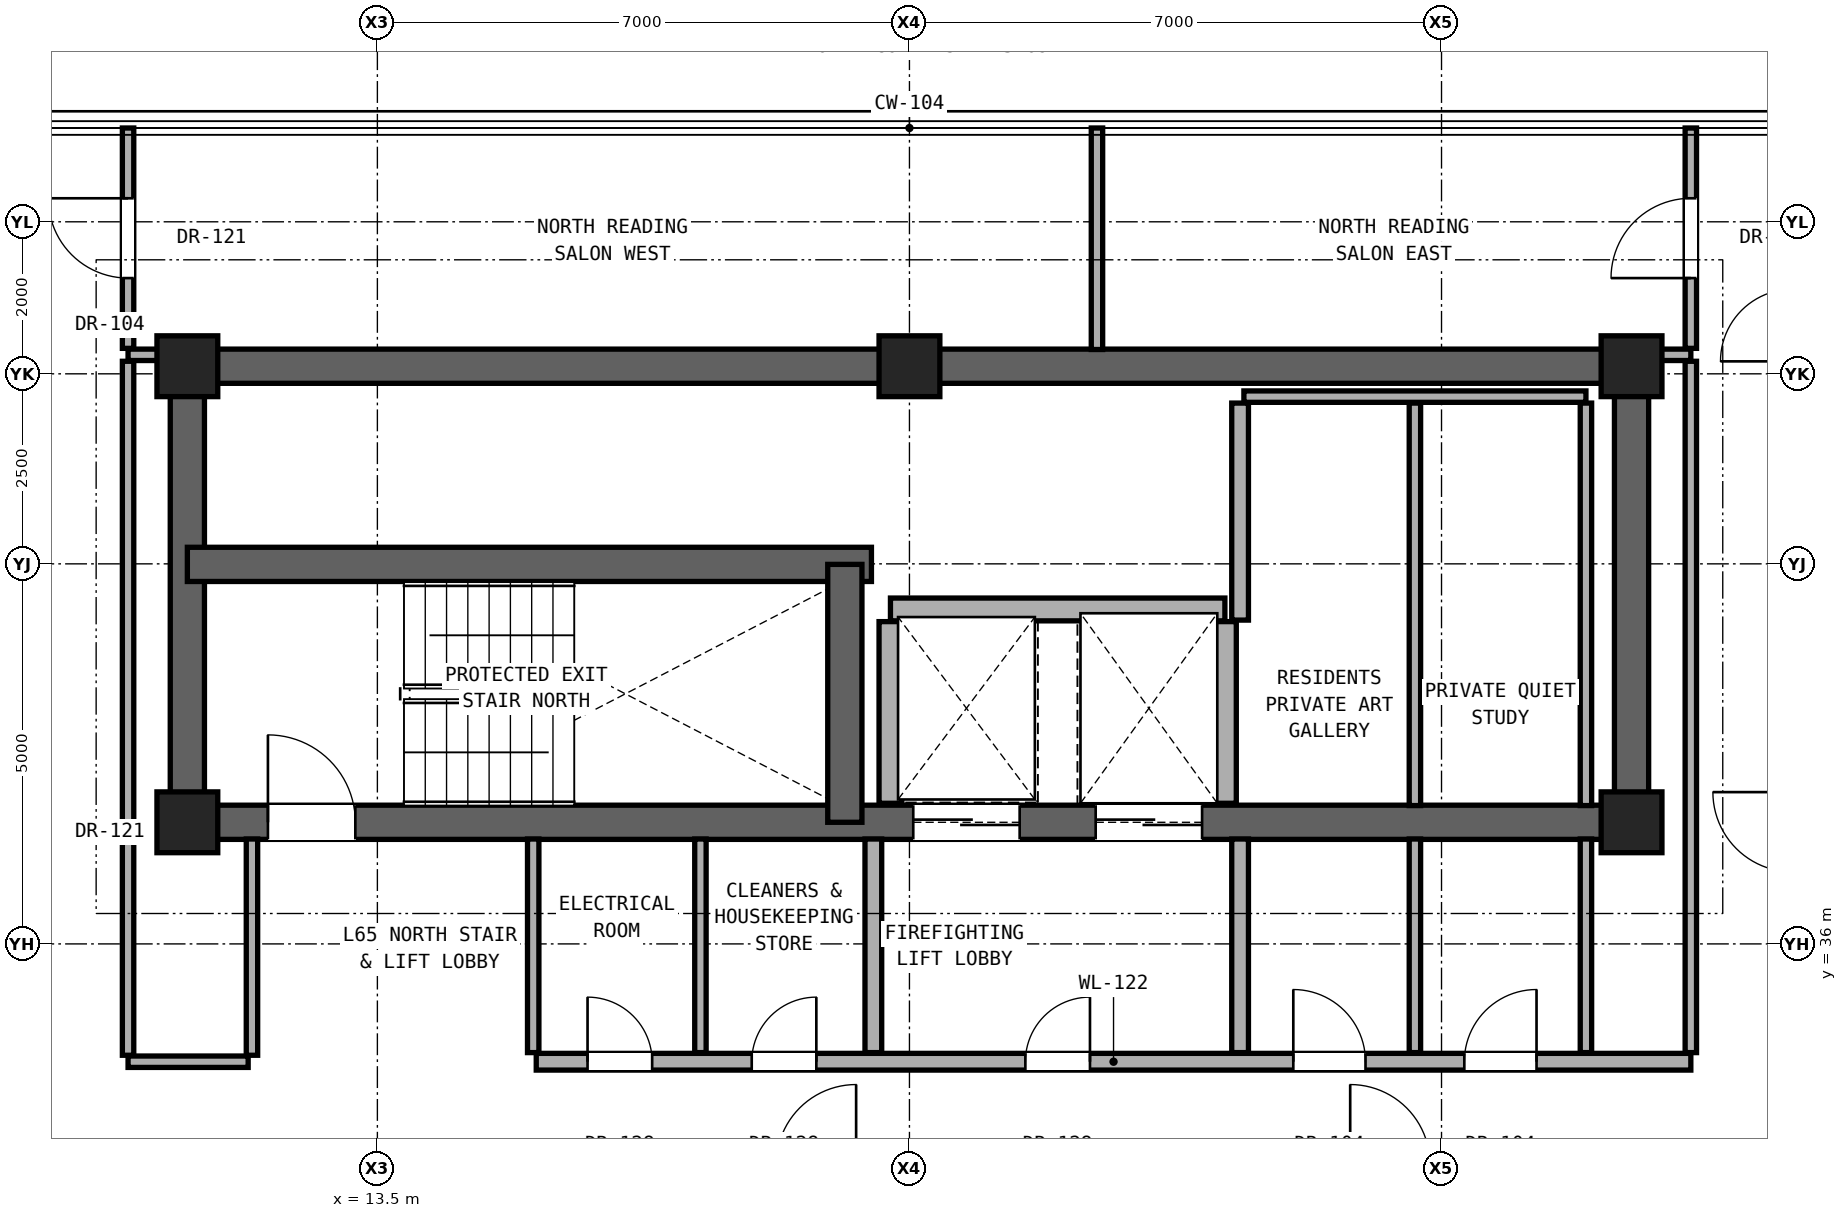
"""IFC4 building model, lengths in metres.
Left out: names, types, materials, properties, quantities, classifications, styles, units other than length and angle.
Written with IfcOpenShell. Run it as: python <this file> out.ifc"""

import sys

from ifc_helpers import new_model, si_unit, direction, frame, frame_2d, origin, origin_2d, place, context, subcontext, project, spatial, rectangle, extrude, element, fill, save


model = new_model("IFC4")
c1 = context("Model", 3, precision=1e-05, world=origin(), true_north=direction((0.0, 1.0)))
c2 = subcontext(c1, "Body", "Model", "MODEL_VIEW")
j1 = project(units=[si_unit("LENGTHUNIT", "METRE"), si_unit("PLANEANGLEUNIT", "RADIAN")], contexts=[c1])
p1 = place(None, origin())
s1 = spatial("IfcSite", under=j1, at=p1, CompositionType="ELEMENT")
p2 = place(p1, origin())
s2 = spatial("IfcBuilding", under=s1, at=p2, CompositionType="ELEMENT")
p3 = place(p2, frame((0.0, 0.0, 229.3)))
s3 = spatial("IfcBuildingStorey", under=s2, at=p3, CompositionType="ELEMENT", Elevation=229.3)
for number, where, z_axis, x_axis in (
    (1, (11.0, 37.6, 0.0), (0.0, 0.0, 1.0), (1.0, 0.0, 0.0)),
    (2, (30.0, 37.6, 0.0), (0.0, 0.0, 1.0), (1.0, 0.0, 0.0)),
    (3, (11.0, 43.6, 0.0), (0.0, 0.0, 1.0), (1.0, 0.0, 0.0)),
    (4, (20.5, 43.6, 0.0), (0.0, 0.0, 1.0), (1.0, 0.0, 0.0)),
    (5, (30.0, 43.6, 0.0), (0.0, 0.0, 1.0), (1.0, 0.0, 0.0)),
):
    element("IfcColumn", number, at=place(p3, frame(where, z_axis=z_axis, x_axis=x_axis)), inside=s3, PredefinedType="COLUMN", context=c2, shape_type="SweptSolid", body=[
        extrude(rectangle(XDim=0.8, YDim=0.8, at=origin_2d()), origin(), (0.0, 0.0, 1.0), 3.3),
    ])
p4 = place(p3, frame((11.0, 43.6, 0.0), z_axis=(0.0, 0.0, 1.0), x_axis=(1.0, 0.0, 0.0)))
e6 = element("IfcWall", 6, at=p4, inside=s3, PredefinedType="SHEAR", context=c2, shape_type="SweptSolid", body=[
    extrude(rectangle(XDim=19.0, YDim=0.45, at=frame_2d((9.5, 0.0))), origin(), (0.0, 0.0, 1.0), 3.1),
])
for number, where, z_axis, x_axis in (
    (7, (11.0, 37.6, 0.0), (0.0, 0.0, 1.0), (0.0, 1.0, 0.0)),
    (8, (30.0, 37.6, 0.0), (0.0, 0.0, 1.0), (0.0, 1.0, 0.0)),
):
    element("IfcWall", number, at=place(p3, frame(where, z_axis=z_axis, x_axis=x_axis)), inside=s3, PredefinedType="SHEAR", context=c2, shape_type="SweptSolid", body=[
        extrude(rectangle(XDim=6.0, YDim=0.45, at=frame_2d((3.0, 0.0))), origin(), (0.0, 0.0, 1.0), 3.1),
    ])
p5 = place(p3, frame((11.0, 37.6, 0.0), z_axis=(0.0, 0.0, 1.0), x_axis=(1.0, 0.0, 0.0)))
e9 = element("IfcWall", 9, at=p5, inside=s3, PredefinedType="SHEAR", context=c2, shape_type="SweptSolid", body=[
    extrude(rectangle(XDim=19.0, YDim=0.45, at=frame_2d((9.5, 0.0))), origin(), (0.0, 0.0, 1.0), 3.1),
])
p6 = place(p5, frame((1.06, 0.0, 0.0)))
e10 = element("IfcOpeningElement", 10, at=p6, cuts=e9, PredefinedType="OPENING", context=c2, shape_type="SweptSolid", body=[
    extrude(rectangle(XDim=1.15, YDim=2.2, at=frame_2d((0.575, 1.1))), frame((0.0, 0.235, 0.0), z_axis=(0.0, -1.0, 0.0), x_axis=(1.0, 0.0, 0.0)), (0.0, 0.0, 1.0), 0.47),
])
p7 = place(p5, frame((9.55, 0.0, 0.0)))
e11 = element("IfcOpeningElement", 11, at=p7, cuts=e9, PredefinedType="OPENING", context=c2, shape_type="SweptSolid", body=[
    extrude(rectangle(XDim=1.4, YDim=2.35, at=frame_2d((0.7, 1.175))), frame((0.0, 0.235, 0.0), z_axis=(0.0, -1.0, 0.0), x_axis=(1.0, 0.0, 0.0)), (0.0, 0.0, 1.0), 0.47),
])
p8 = place(p5, frame((11.95, 0.0, 0.0)))
e12 = element("IfcOpeningElement", 12, at=p8, cuts=e9, PredefinedType="OPENING", context=c2, shape_type="SweptSolid", body=[
    extrude(rectangle(XDim=1.4, YDim=2.35, at=frame_2d((0.7, 1.175))), frame((0.0, 0.235, 0.0), z_axis=(0.0, -1.0, 0.0), x_axis=(1.0, 0.0, 0.0)), (0.0, 0.0, 1.0), 0.47),
])
p9 = place(p3, frame((11.0, 40.993, 0.0), z_axis=(0.0, 0.0, 1.0), x_axis=(1.0, 0.0, 0.0)))
e13 = element("IfcWall", 13, at=p9, inside=s3, PredefinedType="SHEAR", context=c2, shape_type="SweptSolid", body=[
    extrude(rectangle(XDim=9.0, YDim=0.45, at=frame_2d((4.5, 0.0))), origin(), (0.0, 0.0, 1.0), 3.1),
])
p10 = place(p3, frame((19.65, 37.6, 0.0), z_axis=(0.0, 0.0, 1.0), x_axis=(0.0, 1.0, 0.0)))
e14 = element("IfcWall", 14, at=p10, inside=s3, PredefinedType="SHEAR", context=c2, shape_type="SweptSolid", body=[
    extrude(rectangle(XDim=3.393, YDim=0.45, at=frame_2d((1.696, 0.0))), origin(), (0.0, 0.0, 1.0), 3.1),
])
p11 = place(p3, frame((10.22, 34.45, 0.0), z_axis=(0.0, 0.0, 1.0), x_axis=(1.0, 0.0, 0.0)))
e15 = element("IfcWall", 15, at=p11, inside=s3, PredefinedType="PARTITIONING", context=c2, shape_type="SweptSolid", body=[
    extrude(rectangle(XDim=1.58, YDim=0.15, at=frame_2d((0.79, 0.0))), origin(), (0.0, 0.0, 1.0), 2.236),
])
p12 = place(p3, frame((15.59, 34.45, 0.0), z_axis=(0.0, 0.0, 1.0), x_axis=(1.0, 0.0, 0.0)))
e16 = element("IfcWall", 16, at=p12, inside=s3, PredefinedType="SOLIDWALL", context=c2, shape_type="SweptSolid", body=[
    extrude(rectangle(XDim=15.19, YDim=0.22, at=frame_2d((7.595, 0.0))), origin(), (0.0, 0.0, 1.0), 2.236),
])
p13 = place(p12, frame((6.435, 0.0, 0.0)))
e17 = element("IfcOpeningElement", 17, at=p13, cuts=e16, PredefinedType="OPENING", context=c2, shape_type="SweptSolid", body=[
    extrude(rectangle(XDim=0.85, YDim=2.01, at=frame_2d((0.425, 1.005))), frame((0.0, 0.12, 0.0), z_axis=(0.0, -1.0, 0.0), x_axis=(1.0, 0.0, 0.0)), (0.0, 0.0, 1.0), 0.24),
])
p14 = place(p12, frame((9.96, 0.0, 0.0)))
e18 = element("IfcOpeningElement", 18, at=p14, cuts=e16, PredefinedType="OPENING", context=c2, shape_type="SweptSolid", body=[
    extrude(rectangle(XDim=0.95, YDim=2.15, at=frame_2d((0.475, 1.075))), frame((0.0, 0.12, 0.0), z_axis=(0.0, -1.0, 0.0), x_axis=(1.0, 0.0, 0.0)), (0.0, 0.0, 1.0), 0.24),
])
p15 = place(p12, frame((12.21, 0.0, 0.0)))
e19 = element("IfcOpeningElement", 19, at=p15, cuts=e16, PredefinedType="OPENING", context=c2, shape_type="SweptSolid", body=[
    extrude(rectangle(XDim=0.95, YDim=2.15, at=frame_2d((0.475, 1.075))), frame((0.0, 0.12, 0.0), z_axis=(0.0, -1.0, 0.0), x_axis=(1.0, 0.0, 0.0)), (0.0, 0.0, 1.0), 0.24),
])
p16 = place(p12, frame((0.675, 0.0, 0.0)))
e20 = element("IfcOpeningElement", 20, at=p16, cuts=e16, PredefinedType="OPENING", context=c2, shape_type="SweptSolid", body=[
    extrude(rectangle(XDim=0.85, YDim=2.01, at=frame_2d((0.425, 1.005))), frame((0.0, 0.12, 0.0), z_axis=(0.0, -1.0, 0.0), x_axis=(1.0, 0.0, 0.0)), (0.0, 0.0, 1.0), 0.24),
])
p17 = place(p12, frame((2.835, 0.0, 0.0)))
e21 = element("IfcOpeningElement", 21, at=p17, cuts=e16, PredefinedType="OPENING", context=c2, shape_type="SweptSolid", body=[
    extrude(rectangle(XDim=0.85, YDim=2.01, at=frame_2d((0.425, 1.005))), frame((0.0, 0.12, 0.0), z_axis=(0.0, -1.0, 0.0), x_axis=(1.0, 0.0, 0.0)), (0.0, 0.0, 1.0), 0.24),
])
p18 = place(p3, frame((20.25, 40.4, 0.0), z_axis=(0.0, 0.0, 1.0), x_axis=(1.0, 0.0, 0.0)))
e22 = element("IfcWall", 22, at=p18, inside=s3, PredefinedType="SOLIDWALL", context=c2, shape_type="SweptSolid", body=[
    extrude(rectangle(XDim=4.4, YDim=0.3, at=frame_2d((2.2, 0.0))), origin(), (0.0, 0.0, 1.0), 3.1),
])
p19 = place(p3, frame((24.9, 43.2, 0.0), z_axis=(0.0, 0.0, 1.0), x_axis=(1.0, 0.0, 0.0)))
e23 = element("IfcWall", 23, at=p19, inside=s3, PredefinedType="PARTITIONING", context=c2, shape_type="SweptSolid", body=[
    extrude(rectangle(XDim=4.5, YDim=0.15, at=frame_2d((2.25, 0.0))), origin(), (0.0, 0.0, 1.0), 3.1),
])
for number, where, z_axis, x_axis in (
    (24, (10.22, 43.75, 0.0), (0.0, 0.0, 1.0), (1.0, 0.0, 0.0)),
    (25, (30.22, 43.75, 0.0), (0.0, 0.0, 1.0), (1.0, 0.0, 0.0)),
):
    element("IfcWall", number, at=place(p3, frame(where, z_axis=z_axis, x_axis=x_axis)), inside=s3, PredefinedType="PARTITIONING", context=c2, shape_type="SweptSolid", body=[
        extrude(rectangle(XDim=0.56, YDim=0.15, at=frame_2d((0.28, 0.0))), origin(), (0.0, 0.0, 1.0), 3.1),
    ])
p20 = place(p3, frame((10.22, 34.535, 0.0), z_axis=(0.0, 0.0, 1.0), x_axis=(0.0, 1.0, 0.0)))
e26 = element("IfcWall", 26, at=p20, inside=s3, PredefinedType="PARTITIONING", context=c2, shape_type="SweptSolid", body=[
    extrude(rectangle(XDim=9.13, YDim=0.15, at=frame_2d((4.565, 0.0))), origin(), (0.0, 0.0, 1.0), 2.492),
])
p21 = place(p3, frame((10.22, 43.835, 0.0), z_axis=(0.0, 0.0, 1.0), x_axis=(0.0, 1.0, 0.0)))
e27 = element("IfcWall", 27, at=p21, inside=s3, PredefinedType="PARTITIONING", context=c2, shape_type="SweptSolid", body=[
    extrude(rectangle(XDim=2.899, YDim=0.15, at=frame_2d((1.449, 0.0))), origin(), (0.0, 0.0, 1.0), 3.1),
])
p22 = place(p21, frame((0.925, 0.0, 0.0)))
e28 = element("IfcOpeningElement", 28, at=p22, cuts=e27, PredefinedType="OPENING", context=c2, shape_type="SweptSolid", body=[
    extrude(rectangle(XDim=1.05, YDim=2.2, at=frame_2d((0.525, 1.1))), frame((0.0, 0.085, 0.0), z_axis=(0.0, -1.0, 0.0), x_axis=(1.0, 0.0, 0.0)), (0.0, 0.0, 1.0), 0.17),
])
p23 = place(p3, frame((11.85, 34.535, 0.0), z_axis=(0.0, 0.0, 1.0), x_axis=(0.0, 1.0, 0.0)))
e29 = element("IfcWall", 29, at=p23, inside=s3, PredefinedType="PARTITIONING", context=c2, shape_type="SweptSolid", body=[
    extrude(rectangle(XDim=2.845, YDim=0.15, at=frame_2d((1.422, 0.0))), origin(), (0.0, 0.0, 1.0), 3.1),
])
for number, where, z_axis, x_axis in (
    (30, (15.55, 34.57, 0.0), (0.0, 0.0, 1.0), (0.0, 1.0, 0.0)),
    (31, (17.75, 34.57, 0.0), (0.0, 0.0, 1.0), (0.0, 1.0, 0.0)),
):
    element("IfcWall", number, at=place(p3, frame(where, z_axis=z_axis, x_axis=x_axis)), inside=s3, PredefinedType="PARTITIONING", context=c2, shape_type="SweptSolid", body=[
        extrude(rectangle(XDim=2.81, YDim=0.15, at=frame_2d((1.405, 0.0))), origin(), (0.0, 0.0, 1.0), 3.1),
    ])
p24 = place(p3, frame((20.025, 34.57, 0.0), z_axis=(0.0, 0.0, 1.0), x_axis=(0.0, 1.0, 0.0)))
e32 = element("IfcWall", 32, at=p24, inside=s3, PredefinedType="SOLIDWALL", context=c2, shape_type="SweptSolid", body=[
    extrude(rectangle(XDim=2.81, YDim=0.22, at=frame_2d((1.405, 0.0))), origin(), (0.0, 0.0, 1.0), 3.1),
])
p25 = place(p3, frame((20.25, 37.85, 0.0), z_axis=(0.0, 0.0, 1.0), x_axis=(0.0, 1.0, 0.0)))
e33 = element("IfcWall", 33, at=p25, inside=s3, PredefinedType="SOLIDWALL", context=c2, shape_type="SweptSolid", body=[
    extrude(rectangle(XDim=2.39, YDim=0.3, at=frame_2d((1.195, 0.0))), origin(), (0.0, 0.0, 1.0), 3.1),
])
p26 = place(p3, frame((22.967, 43.82, 0.0), z_axis=(0.0, 0.0, 1.0), x_axis=(0.0, 1.0, 0.0)))
e34 = element("IfcWall", 34, at=p26, inside=s3, PredefinedType="PARTITIONING", context=c2, shape_type="SweptSolid", body=[
    extrude(rectangle(XDim=2.914, YDim=0.15, at=frame_2d((1.457, 0.0))), origin(), (0.0, 0.0, 1.0), 3.1),
])
p27 = place(p3, frame((24.65, 37.85, 0.0), z_axis=(0.0, 0.0, 1.0), x_axis=(0.0, 1.0, 0.0)))
e35 = element("IfcWall", 35, at=p27, inside=s3, PredefinedType="SOLIDWALL", context=c2, shape_type="SweptSolid", body=[
    extrude(rectangle(XDim=2.39, YDim=0.3, at=frame_2d((1.195, 0.0))), origin(), (0.0, 0.0, 1.0), 3.1),
])
p28 = place(p3, frame((24.85, 34.57, 0.0), z_axis=(0.0, 0.0, 1.0), x_axis=(0.0, 1.0, 0.0)))
e36 = element("IfcWall", 36, at=p28, inside=s3, PredefinedType="SOLIDWALL", context=c2, shape_type="SweptSolid", body=[
    extrude(rectangle(XDim=2.81, YDim=0.22, at=frame_2d((1.405, 0.0))), origin(), (0.0, 0.0, 1.0), 3.1),
])
p29 = place(p3, frame((24.85, 40.26, 0.0), z_axis=(0.0, 0.0, 1.0), x_axis=(0.0, 1.0, 0.0)))
e37 = element("IfcWall", 37, at=p29, inside=s3, PredefinedType="SOLIDWALL", context=c2, shape_type="SweptSolid", body=[
    extrude(rectangle(XDim=2.855, YDim=0.22, at=frame_2d((1.427, 0.0))), origin(), (0.0, 0.0, 1.0), 3.1),
])
p30 = place(p3, frame((27.15, 34.57, 0.0), z_axis=(0.0, 0.0, 1.0), x_axis=(0.0, 1.0, 0.0)))
e38 = element("IfcWall", 38, at=p30, inside=s3, PredefinedType="PARTITIONING", context=c2, shape_type="SweptSolid", body=[
    extrude(rectangle(XDim=2.81, YDim=0.15, at=frame_2d((1.405, 0.0))), origin(), (0.0, 0.0, 1.0), 3.1),
])
p31 = place(p3, frame((27.15, 37.82, 0.0), z_axis=(0.0, 0.0, 1.0), x_axis=(0.0, 1.0, 0.0)))
e39 = element("IfcWall", 39, at=p31, inside=s3, PredefinedType="PARTITIONING", context=c2, shape_type="SweptSolid", body=[
    extrude(rectangle(XDim=5.295, YDim=0.15, at=frame_2d((2.647, 0.0))), origin(), (0.0, 0.0, 1.0), 3.1),
])
p32 = place(p3, frame((29.4, 34.57, 0.0), z_axis=(0.0, 0.0, 1.0), x_axis=(0.0, 1.0, 0.0)))
e40 = element("IfcWall", 40, at=p32, inside=s3, PredefinedType="PARTITIONING", context=c2, shape_type="SweptSolid", body=[
    extrude(rectangle(XDim=2.81, YDim=0.15, at=frame_2d((1.405, 0.0))), origin(), (0.0, 0.0, 1.0), 3.1),
])
p33 = place(p3, frame((29.4, 37.82, 0.0), z_axis=(0.0, 0.0, 1.0), x_axis=(0.0, 1.0, 0.0)))
e41 = element("IfcWall", 41, at=p33, inside=s3, PredefinedType="PARTITIONING", context=c2, shape_type="SweptSolid", body=[
    extrude(rectangle(XDim=5.295, YDim=0.15, at=frame_2d((2.647, 0.0))), origin(), (0.0, 0.0, 1.0), 3.1),
])
p34 = place(p3, frame((30.78, 34.57, 0.0), z_axis=(0.0, 0.0, 1.0), x_axis=(0.0, 1.0, 0.0)))
e42 = element("IfcWall", 42, at=p34, inside=s3, PredefinedType="PARTITIONING", context=c2, shape_type="SweptSolid", body=[
    extrude(rectangle(XDim=9.095, YDim=0.15, at=frame_2d((4.547, 0.0))), origin(), (0.0, 0.0, 1.0), 2.492),
])
p35 = place(p3, frame((30.78, 43.835, 0.0), z_axis=(0.0, 0.0, 1.0), x_axis=(0.0, 1.0, 0.0)))
e43 = element("IfcWall", 43, at=p35, inside=s3, PredefinedType="PARTITIONING", context=c2, shape_type="SweptSolid", body=[
    extrude(rectangle(XDim=2.899, YDim=0.15, at=frame_2d((1.449, 0.0))), origin(), (0.0, 0.0, 1.0), 3.1),
])
p36 = place(p35, frame((0.925, 0.0, 0.0)))
e44 = element("IfcOpeningElement", 44, at=p36, cuts=e43, PredefinedType="OPENING", context=c2, shape_type="SweptSolid", body=[
    extrude(rectangle(XDim=1.05, YDim=2.2, at=frame_2d((0.525, 1.1))), frame((0.0, 0.085, 0.0), z_axis=(0.0, -1.0, 0.0), x_axis=(1.0, 0.0, 0.0)), (0.0, 0.0, 1.0), 0.17),
])
p37 = place(p6, origin())
e45 = element("IfcDoor", 45, at=p37, inside=s3, OperationType="SINGLE_SWING_LEFT", PredefinedType="DOOR", context=c2, shape_type="SweptSolid", body=[
    extrude(rectangle(XDim=1.15, YDim=2.2, at=frame_2d((0.575, 1.1))), frame((0.0, 0.025, 0.0), z_axis=(0.0, -1.0, 0.0), x_axis=(1.0, 0.0, 0.0)), (0.0, 0.0, 1.0), 0.05),
])
fill(e10, e45)
p38 = place(p13, origin())
e46 = element("IfcDoor", 46, at=p38, inside=s3, OperationType="SINGLE_SWING_RIGHT", PredefinedType="DOOR", context=c2, shape_type="SweptSolid", body=[
    extrude(rectangle(XDim=0.85, YDim=2.01, at=frame_2d((0.425, 1.005))), frame((0.0, 0.025, 0.0), z_axis=(0.0, -1.0, 0.0), x_axis=(1.0, 0.0, 0.0)), (0.0, 0.0, 1.0), 0.05),
])
fill(e17, e46)
p39 = place(p14, origin())
e47 = element("IfcDoor", 47, at=p39, inside=s3, OperationType="SINGLE_SWING_LEFT", PredefinedType="DOOR", context=c2, shape_type="SweptSolid", body=[
    extrude(rectangle(XDim=0.95, YDim=2.15, at=frame_2d((0.475, 1.075))), frame((0.0, 0.025, 0.0), z_axis=(0.0, -1.0, 0.0), x_axis=(1.0, 0.0, 0.0)), (0.0, 0.0, 1.0), 0.05),
])
fill(e18, e47)
p40 = place(p15, origin())
e48 = element("IfcDoor", 48, at=p40, inside=s3, OperationType="SINGLE_SWING_RIGHT", PredefinedType="DOOR", context=c2, shape_type="SweptSolid", body=[
    extrude(rectangle(XDim=0.95, YDim=2.15, at=frame_2d((0.475, 1.075))), frame((0.0, 0.025, 0.0), z_axis=(0.0, -1.0, 0.0), x_axis=(1.0, 0.0, 0.0)), (0.0, 0.0, 1.0), 0.05),
])
fill(e19, e48)
p41 = place(p16, origin())
e49 = element("IfcDoor", 49, at=p41, inside=s3, OperationType="SINGLE_SWING_LEFT", PredefinedType="DOOR", context=c2, shape_type="SweptSolid", body=[
    extrude(rectangle(XDim=0.85, YDim=2.01, at=frame_2d((0.425, 1.005))), frame((0.0, 0.025, 0.0), z_axis=(0.0, -1.0, 0.0), x_axis=(1.0, 0.0, 0.0)), (0.0, 0.0, 1.0), 0.05),
])
fill(e20, e49)
p42 = place(p17, origin())
e50 = element("IfcDoor", 50, at=p42, inside=s3, OperationType="SINGLE_SWING_RIGHT", PredefinedType="DOOR", context=c2, shape_type="SweptSolid", body=[
    extrude(rectangle(XDim=0.85, YDim=2.01, at=frame_2d((0.425, 1.005))), frame((0.0, 0.025, 0.0), z_axis=(0.0, -1.0, 0.0), x_axis=(1.0, 0.0, 0.0)), (0.0, 0.0, 1.0), 0.05),
])
fill(e21, e50)
p43 = place(p22, origin())
e51 = element("IfcDoor", 51, at=p43, inside=s3, OperationType="SINGLE_SWING_RIGHT", PredefinedType="DOOR", context=c2, shape_type="SweptSolid", body=[
    extrude(rectangle(XDim=1.05, YDim=2.2, at=frame_2d((0.525, 1.1))), frame((0.0, 0.025, 0.0), z_axis=(0.0, -1.0, 0.0), x_axis=(1.0, 0.0, 0.0)), (0.0, 0.0, 1.0), 0.05),
])
fill(e28, e51)
p44 = place(p36, origin())
e52 = element("IfcDoor", 52, at=p44, inside=s3, OperationType="SINGLE_SWING_LEFT", PredefinedType="DOOR", context=c2, shape_type="SweptSolid", body=[
    extrude(rectangle(XDim=1.05, YDim=2.2, at=frame_2d((0.525, 1.1))), frame((0.0, 0.025, 0.0), z_axis=(0.0, -1.0, 0.0), x_axis=(1.0, 0.0, 0.0)), (0.0, 0.0, 1.0), 0.05),
])
fill(e44, e52)
p45 = place(p7, origin())
e53 = element("IfcDoor", 53, at=p45, inside=s3, OperationType="DOUBLE_DOOR_SLIDING", PredefinedType="DOOR", context=c2, shape_type="SweptSolid", body=[
    extrude(rectangle(XDim=1.4, YDim=2.35, at=frame_2d((0.7, 1.175))), frame((0.0, 0.025, 0.0), z_axis=(0.0, -1.0, 0.0), x_axis=(1.0, 0.0, 0.0)), (0.0, 0.0, 1.0), 0.05),
])
fill(e11, e53)
p46 = place(p8, origin())
e54 = element("IfcDoor", 54, at=p46, inside=s3, OperationType="DOUBLE_DOOR_SLIDING", PredefinedType="DOOR", context=c2, shape_type="SweptSolid", body=[
    extrude(rectangle(XDim=1.4, YDim=2.35, at=frame_2d((0.7, 1.175))), frame((0.0, 0.025, 0.0), z_axis=(0.0, -1.0, 0.0), x_axis=(1.0, 0.0, 0.0)), (0.0, 0.0, 1.0), 0.05),
])
fill(e12, e54)
save(model, sys.argv[1])
